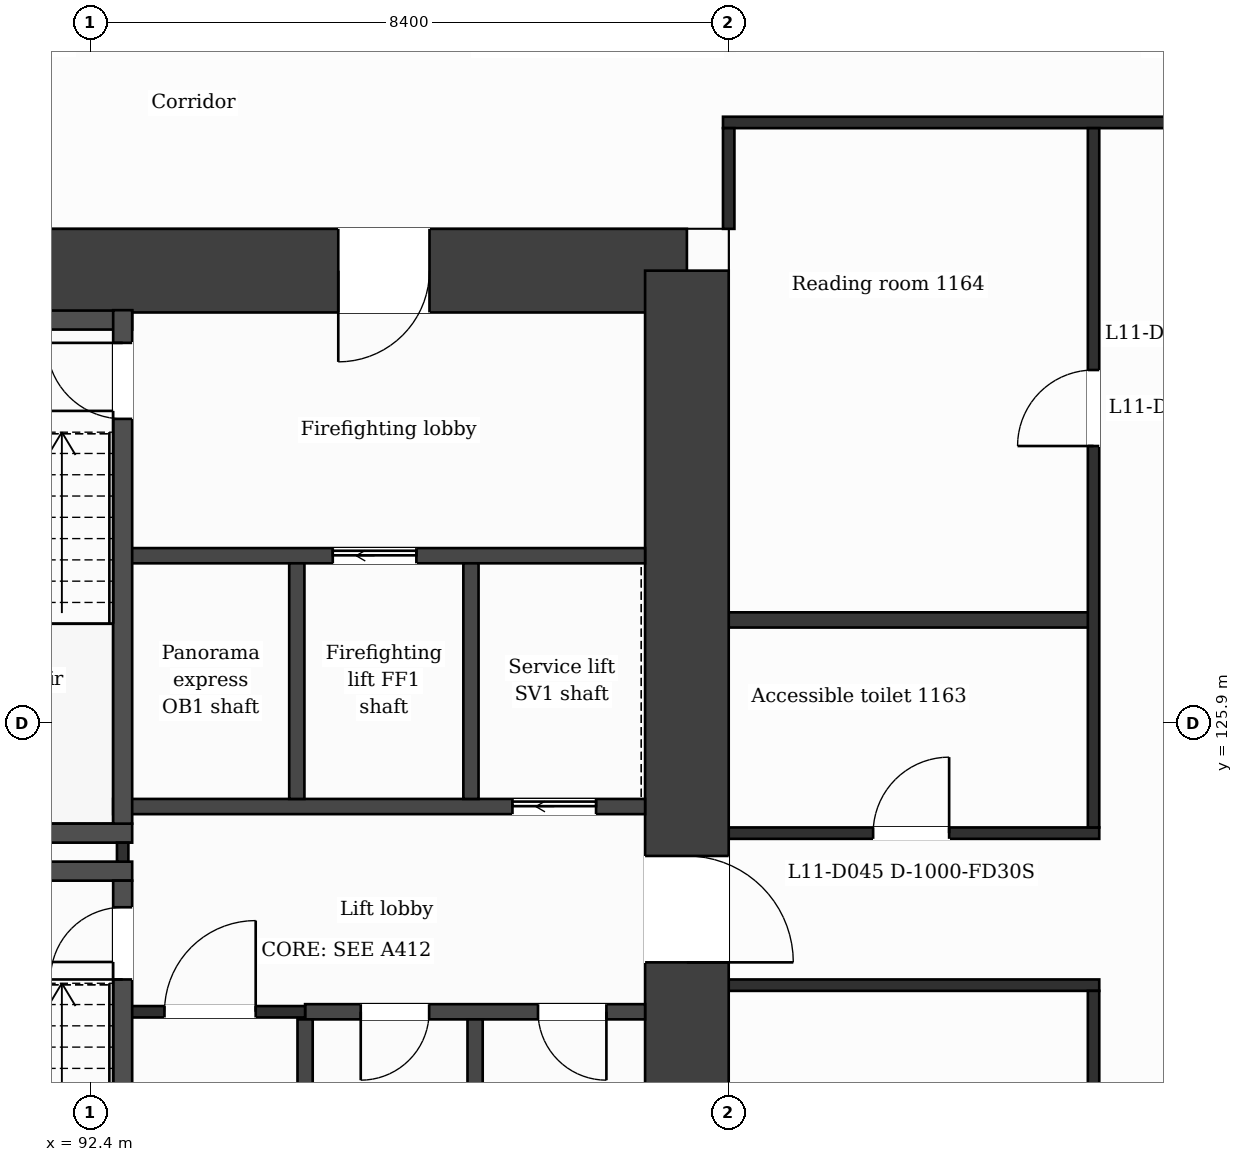
"""IFC4 building model, lengths in metres.
Left out: names, types, materials, properties, quantities, classifications, styles, units other than length and angle.
Written with IfcOpenShell. Run it as: python <this file> out.ifc"""

import sys

from ifc_helpers import new_model, si_unit, direction, frame, frame_2d, origin, place, context, subcontext, project, spatial, rectangle, extrude, element, fill, save


model = new_model("IFC4")
c1 = context("Model", 3, precision=1e-05, world=origin(), true_north=direction((0.0, 1.0)))
c2 = subcontext(c1, "Body", "Model", "MODEL_VIEW")
j1 = project(units=[si_unit("LENGTHUNIT", "METRE"), si_unit("PLANEANGLEUNIT", "RADIAN")], contexts=[c1])
p1 = place(None, origin())
s1 = spatial("IfcSite", under=j1, at=p1, CompositionType="ELEMENT")
p2 = place(p1, origin())
s2 = spatial("IfcBuilding", under=s1, at=p2, CompositionType="ELEMENT")
p3 = place(p2, frame((0.0, 0.0, 56.5)))
s3 = spatial("IfcBuildingStorey", under=s2, at=p3, CompositionType="ELEMENT", Elevation=56.5)
p4 = place(p3, frame((89.112, 131.85, 0.0), z_axis=(0.0, 0.0, 1.0), x_axis=(1.0, 0.0, 0.0)))
e1 = element("IfcWall", 1, at=p4, inside=s3, PredefinedType="SHEAR", context=c2, shape_type="SweptSolid", body=[
    extrude(rectangle(XDim=11.138, YDim=1.1, at=frame_2d((5.569, 0.0))), origin(), (0.0, 0.0, 1.0), 3.5),
])
p5 = place(p4, frame((6.552, 0.0, 0.0)))
e2 = element("IfcOpeningElement", 2, at=p5, cuts=e1, PredefinedType="OPENING", context=c2, shape_type="SweptSolid", body=[
    extrude(rectangle(XDim=1.2, YDim=2.1, at=frame_2d((0.6, 1.05))), frame((0.0, 0.56, 0.0), z_axis=(0.0, -1.0, 0.0), x_axis=(1.0, 0.0, 0.0)), (0.0, 0.0, 1.0), 1.12),
])
p6 = place(p3, frame((100.25, 131.85, 0.0), z_axis=(0.0, 0.0, 1.0), x_axis=(0.0, -1.0, 0.0)))
e3 = element("IfcWall", 3, at=p6, inside=s3, PredefinedType="SHEAR", context=c2, shape_type="SweptSolid", body=[
    extrude(rectangle(XDim=20.9, YDim=1.1, at=frame_2d((10.45, 0.0))), origin(), (0.0, 0.0, 1.0), 3.5),
])
p7 = place(p6, frame((7.7, 0.0, 0.0)))
e4 = element("IfcOpeningElement", 4, at=p7, cuts=e3, PredefinedType="OPENING", context=c2, shape_type="SweptSolid", body=[
    extrude(rectangle(XDim=1.4, YDim=2.1, at=frame_2d((0.7, 1.05))), frame((0.0, 0.56, 0.0), z_axis=(0.0, -1.0, 0.0), x_axis=(1.0, 0.0, 0.0)), (0.0, 0.0, 1.0), 1.12),
])
p8 = place(p3, frame((95.227, 122.1, 0.0), z_axis=(0.0, 0.0, 1.0), x_axis=(1.0, 0.0, 0.0)))
e5 = element("IfcWall", 5, at=p8, inside=s3, PredefinedType="PARTITIONING", context=c2, shape_type="SweptSolid", body=[
    extrude(rectangle(XDim=4.473, YDim=0.2, at=frame_2d((2.236, 0.0))), origin(), (0.0, 0.0, 1.0), 3.18),
])
p9 = place(p8, frame((0.732, 0.0, 0.0)))
e6 = element("IfcOpeningElement", 6, at=p9, cuts=e5, PredefinedType="OPENING", context=c2, shape_type="SweptSolid", body=[
    extrude(rectangle(XDim=0.9, YDim=2.1, at=frame_2d((0.45, 1.05))), frame((0.0, 0.11, 0.0), z_axis=(0.0, -1.0, 0.0), x_axis=(1.0, 0.0, 0.0)), (0.0, 0.0, 1.0), 0.22),
])
p10 = place(p8, frame((3.064, 0.0, 0.0)))
e7 = element("IfcOpeningElement", 7, at=p10, cuts=e5, PredefinedType="OPENING", context=c2, shape_type="SweptSolid", body=[
    extrude(rectangle(XDim=0.9, YDim=2.1, at=frame_2d((0.45, 1.05))), frame((0.0, 0.11, 0.0), z_axis=(0.0, -1.0, 0.0), x_axis=(1.0, 0.0, 0.0)), (0.0, 0.0, 1.0), 0.22),
])
p11 = place(p3, frame((92.827, 122.1, 0.0), z_axis=(0.0, 0.0, 1.0), x_axis=(1.0, 0.0, 0.0)))
e8 = element("IfcWall", 8, at=p11, inside=s3, PredefinedType="PARTITIONING", context=c2, shape_type="SweptSolid", body=[
    extrude(rectangle(XDim=2.4, YDim=0.15, at=frame_2d((1.2, 0.0))), origin(), (0.0, 0.0, 1.0), 3.18),
])
p12 = place(p11, frame((0.55, 0.0, 0.0)))
e9 = element("IfcOpeningElement", 9, at=p12, cuts=e8, PredefinedType="OPENING", context=c2, shape_type="SweptSolid", body=[
    extrude(rectangle(XDim=1.2, YDim=2.1, at=frame_2d((0.6, 1.05))), frame((0.0, 0.085, 0.0), z_axis=(0.0, -1.0, 0.0), x_axis=(1.0, 0.0, 0.0)), (0.0, 0.0, 1.0), 0.17),
])
p13 = place(p3, frame((100.8, 122.45, 0.0), z_axis=(0.0, 0.0, 1.0), x_axis=(1.0, 0.0, 0.0)))
e10 = element("IfcWall", 10, at=p13, inside=s3, PredefinedType="PARTITIONING", context=c2, shape_type="SweptSolid", body=[
    extrude(rectangle(XDim=4.875, YDim=0.15, at=frame_2d((2.438, 0.0))), origin(), (0.0, 0.0, 1.0), 3.18),
])
for number, where, z_axis, x_axis in (
    (11, (89.552, 123.95, 0.0), (0.0, 0.0, 1.0), (1.0, 0.0, 0.0)),
    (12, (89.552, 124.45, 0.0), (0.0, 0.0, 1.0), (1.0, 0.0, 0.0)),
):
    element("IfcWall", number, at=place(p3, frame(where, z_axis=z_axis, x_axis=x_axis)), inside=s3, PredefinedType="PARTITIONING", context=c2, shape_type="SweptSolid", body=[
        extrude(rectangle(XDim=3.4, YDim=0.25, at=frame_2d((1.7, 0.0))), origin(), (0.0, 0.0, 1.0), 3.18),
    ])
p14 = place(p3, frame((100.8, 124.45, 0.0), z_axis=(0.0, 0.0, 1.0), x_axis=(1.0, 0.0, 0.0)))
e13 = element("IfcWall", 13, at=p14, inside=s3, PredefinedType="PARTITIONING", context=c2, shape_type="SweptSolid", body=[
    extrude(rectangle(XDim=4.875, YDim=0.15, at=frame_2d((2.438, 0.0))), origin(), (0.0, 0.0, 1.0), 3.18),
])
p15 = place(p14, frame((1.9, 0.0, 0.0)))
e14 = element("IfcOpeningElement", 14, at=p15, cuts=e13, PredefinedType="OPENING", context=c2, shape_type="SweptSolid", body=[
    extrude(rectangle(XDim=1.0, YDim=2.1, at=frame_2d((0.5, 1.05))), frame((0.0, 0.085, 0.0), z_axis=(0.0, -1.0, 0.0), x_axis=(1.0, 0.0, 0.0)), (0.0, 0.0, 1.0), 0.17),
])
p16 = place(p3, frame((92.702, 124.8, 0.0), z_axis=(0.0, 0.0, 1.0), x_axis=(1.0, 0.0, 0.0)))
e15 = element("IfcWall", 15, at=p16, inside=s3, PredefinedType="PARTITIONING", context=c2, shape_type="SweptSolid", body=[
    extrude(rectangle(XDim=6.998, YDim=0.2, at=frame_2d((3.499, 0.0))), origin(), (0.0, 0.0, 1.0), 3.18),
])
p17 = place(p16, frame((5.253, 0.0, 0.0)))
e16 = element("IfcOpeningElement", 16, at=p17, cuts=e15, PredefinedType="OPENING", context=c2, shape_type="SweptSolid", body=[
    extrude(rectangle(XDim=1.1, YDim=2.1, at=frame_2d((0.55, 1.05))), frame((0.0, 0.11, 0.0), z_axis=(0.0, -1.0, 0.0), x_axis=(1.0, 0.0, 0.0)), (0.0, 0.0, 1.0), 0.22),
])
p18 = place(p3, frame((100.8, 127.255, 0.0), z_axis=(0.0, 0.0, 1.0), x_axis=(1.0, 0.0, 0.0)))
e17 = element("IfcWall", 17, at=p18, inside=s3, PredefinedType="PARTITIONING", context=c2, shape_type="SweptSolid", body=[
    extrude(rectangle(XDim=4.8, YDim=0.2, at=frame_2d((2.4, 0.0))), origin(), (0.0, 0.0, 1.0), 3.18),
])
p19 = place(p3, frame((92.827, 128.1, 0.0), z_axis=(0.0, 0.0, 1.0), x_axis=(1.0, 0.0, 0.0)))
e18 = element("IfcWall", 18, at=p19, inside=s3, PredefinedType="PARTITIONING", context=c2, shape_type="SweptSolid", body=[
    extrude(rectangle(XDim=6.873, YDim=0.2, at=frame_2d((3.437, 0.0))), origin(), (0.0, 0.0, 1.0), 3.18),
])
p20 = place(p19, frame((2.764, 0.0, 0.0)))
e19 = element("IfcOpeningElement", 19, at=p20, cuts=e18, PredefinedType="OPENING", context=c2, shape_type="SweptSolid", body=[
    extrude(rectangle(XDim=1.1, YDim=2.1, at=frame_2d((0.55, 1.05))), frame((0.0, 0.11, 0.0), z_axis=(0.0, -1.0, 0.0), x_axis=(1.0, 0.0, 0.0)), (0.0, 0.0, 1.0), 0.22),
])
p21 = place(p3, frame((89.552, 131.2, 0.0), z_axis=(0.0, 0.0, 1.0), x_axis=(1.0, 0.0, 0.0)))
e20 = element("IfcWall", 20, at=p21, inside=s3, PredefinedType="PARTITIONING", context=c2, shape_type="SweptSolid", body=[
    extrude(rectangle(XDim=3.4, YDim=0.25, at=frame_2d((1.7, 0.0))), origin(), (0.0, 0.0, 1.0), 3.18),
])
p22 = place(p3, frame((100.725, 133.8, 0.0), z_axis=(0.0, 0.0, 1.0), x_axis=(1.0, 0.0, 0.0)))
e21 = element("IfcWall", 21, at=p22, inside=s3, PredefinedType="PARTITIONING", context=c2, shape_type="SweptSolid", body=[
    extrude(rectangle(XDim=25.35, YDim=0.15, at=frame_2d((12.675, 0.0))), origin(), (0.0, 0.0, 1.0), 3.18),
])
p23 = place(p3, frame((92.827, 124.075, 0.0), z_axis=(0.0, 0.0, 1.0), x_axis=(0.0, 1.0, 0.0)))
e22 = element("IfcWall", 22, at=p23, inside=s3, PredefinedType="PARTITIONING", context=c2, shape_type="SweptSolid", body=[
    extrude(rectangle(XDim=0.25, YDim=0.15, at=frame_2d((0.125, 0.0))), origin(), (0.0, 0.0, 1.0), 3.18),
])
p24 = place(p3, frame((92.827, 117.07, 0.0), z_axis=(0.0, 0.0, 1.0), x_axis=(0.0, 1.0, 0.0)))
e23 = element("IfcWall", 23, at=p24, inside=s3, PredefinedType="PARTITIONING", context=c2, shape_type="SweptSolid", body=[
    extrude(rectangle(XDim=6.755, YDim=0.25, at=frame_2d((3.377, 0.0))), origin(), (0.0, 0.0, 1.0), 3.18),
])
p25 = place(p24, frame((5.455, 0.0, 0.0)))
e24 = element("IfcOpeningElement", 24, at=p25, cuts=e23, PredefinedType="OPENING", context=c2, shape_type="SweptSolid", body=[
    extrude(rectangle(XDim=0.95, YDim=2.1, at=frame_2d((0.475, 1.05))), frame((0.0, 0.135, 0.0), z_axis=(0.0, -1.0, 0.0), x_axis=(1.0, 0.0, 0.0)), (0.0, 0.0, 1.0), 0.27),
])
p26 = place(p3, frame((92.827, 124.575, 0.0), z_axis=(0.0, 0.0, 1.0), x_axis=(0.0, 1.0, 0.0)))
e25 = element("IfcWall", 25, at=p26, inside=s3, PredefinedType="PARTITIONING", context=c2, shape_type="SweptSolid", body=[
    extrude(rectangle(XDim=6.755, YDim=0.25, at=frame_2d((3.377, 0.0))), origin(), (0.0, 0.0, 1.0), 3.18),
])
p27 = place(p26, frame((5.325, 0.0, 0.0)))
e26 = element("IfcOpeningElement", 26, at=p27, cuts=e25, PredefinedType="OPENING", context=c2, shape_type="SweptSolid", body=[
    extrude(rectangle(XDim=1.0, YDim=2.1, at=frame_2d((0.5, 1.05))), frame((0.0, 0.135, 0.0), z_axis=(0.0, -1.0, 0.0), x_axis=(1.0, 0.0, 0.0)), (0.0, 0.0, 1.0), 0.27),
])
p28 = place(p3, frame((95.118, 124.9, 0.0), z_axis=(0.0, 0.0, 1.0), x_axis=(0.0, 1.0, 0.0)))
e27 = element("IfcWall", 27, at=p28, inside=s3, PredefinedType="PARTITIONING", context=c2, shape_type="SweptSolid", body=[
    extrude(rectangle(XDim=3.1, YDim=0.2, at=frame_2d((1.55, 0.0))), origin(), (0.0, 0.0, 1.0), 3.18),
])
p29 = place(p3, frame((95.227, 117.07, 0.0), z_axis=(0.0, 0.0, 1.0), x_axis=(0.0, 1.0, 0.0)))
e28 = element("IfcWall", 28, at=p29, inside=s3, PredefinedType="PARTITIONING", context=c2, shape_type="SweptSolid", body=[
    extrude(rectangle(XDim=4.93, YDim=0.2, at=frame_2d((2.465, 0.0))), origin(), (0.0, 0.0, 1.0), 3.18),
])
p30 = place(p29, frame((0.48, 0.0, 0.0)))
e29 = element("IfcOpeningElement", 29, at=p30, cuts=e28, PredefinedType="OPENING", context=c2, shape_type="SweptSolid", body=[
    extrude(rectangle(XDim=0.9, YDim=2.1, at=frame_2d((0.45, 1.05))), frame((0.0, 0.11, 0.0), z_axis=(0.0, -1.0, 0.0), x_axis=(1.0, 0.0, 0.0)), (0.0, 0.0, 1.0), 0.22),
])
for number, where, z_axis, x_axis in (
    (30, (97.409, 124.9, 0.0), (0.0, 0.0, 1.0), (0.0, 1.0, 0.0)),
    (31, (97.463, 118.9, 0.0), (0.0, 0.0, 1.0), (0.0, 1.0, 0.0)),
):
    element("IfcWall", number, at=place(p3, frame(where, z_axis=z_axis, x_axis=x_axis)), inside=s3, PredefinedType="PARTITIONING", context=c2, shape_type="SweptSolid", body=[
        extrude(rectangle(XDim=3.1, YDim=0.2, at=frame_2d((1.55, 0.0))), origin(), (0.0, 0.0, 1.0), 3.18),
    ])
p31 = place(p3, frame((100.8, 132.4, 0.0), z_axis=(0.0, 0.0, 1.0), x_axis=(0.0, 1.0, 0.0)))
e32 = element("IfcWall", 32, at=p31, inside=s3, PredefinedType="PARTITIONING", context=c2, shape_type="SweptSolid", body=[
    extrude(rectangle(XDim=1.325, YDim=0.15, at=frame_2d((0.663, 0.0))), origin(), (0.0, 0.0, 1.0), 3.18),
])
p32 = place(p3, frame((105.6, 109.075, 0.0), z_axis=(0.0, 0.0, 1.0), x_axis=(0.0, 1.0, 0.0)))
e33 = element("IfcWall", 33, at=p32, inside=s3, PredefinedType="PARTITIONING", context=c2, shape_type="SweptSolid", body=[
    extrude(rectangle(XDim=13.3, YDim=0.15, at=frame_2d((6.65, 0.0))), origin(), (0.0, 0.0, 1.0), 3.18),
])
p33 = place(p32, frame((8.167, 0.0, 0.0)))
e34 = element("IfcOpeningElement", 34, at=p33, cuts=e33, PredefinedType="OPENING", context=c2, shape_type="SweptSolid", body=[
    extrude(rectangle(XDim=1.0, YDim=2.1, at=frame_2d((0.5, 1.05))), frame((0.0, 0.085, 0.0), z_axis=(0.0, -1.0, 0.0), x_axis=(1.0, 0.0, 0.0)), (0.0, 0.0, 1.0), 0.17),
])
p34 = place(p3, frame((105.6, 124.525, 0.0), z_axis=(0.0, 0.0, 1.0), x_axis=(0.0, 1.0, 0.0)))
e35 = element("IfcWall", 35, at=p34, inside=s3, PredefinedType="PARTITIONING", context=c2, shape_type="SweptSolid", body=[
    extrude(rectangle(XDim=9.2, YDim=0.15, at=frame_2d((4.6, 0.0))), origin(), (0.0, 0.0, 1.0), 3.18),
])
p35 = place(p34, frame((5.018, 0.0, 0.0)))
e36 = element("IfcOpeningElement", 36, at=p35, cuts=e35, PredefinedType="OPENING", context=c2, shape_type="SweptSolid", body=[
    extrude(rectangle(XDim=1.0, YDim=2.1, at=frame_2d((0.5, 1.05))), frame((0.0, 0.085, 0.0), z_axis=(0.0, -1.0, 0.0), x_axis=(1.0, 0.0, 0.0)), (0.0, 0.0, 1.0), 0.17),
])
p36 = place(p12, origin())
e37 = element("IfcDoor", 37, at=p36, inside=s3, OperationType="SINGLE_SWING_RIGHT", PredefinedType="DOOR", context=c2, shape_type="SweptSolid", body=[
    extrude(rectangle(XDim=1.2, YDim=2.1, at=frame_2d((0.6, 1.05))), frame((0.0, 0.025, 0.0), z_axis=(0.0, -1.0, 0.0), x_axis=(1.0, 0.0, 0.0)), (0.0, 0.0, 1.0), 0.05),
])
fill(e9, e37)
p37 = place(p20, origin())
e38 = element("IfcDoor", 38, at=p37, inside=s3, OperationType="SLIDING_TO_LEFT", PredefinedType="DOOR", context=c2, shape_type="SweptSolid", body=[
    extrude(rectangle(XDim=1.1, YDim=2.1, at=frame_2d((0.55, 1.05))), frame((0.0, 0.025, 0.0), z_axis=(0.0, -1.0, 0.0), x_axis=(1.0, 0.0, 0.0)), (0.0, 0.0, 1.0), 0.05),
])
fill(e19, e38)
p38 = place(p17, origin())
e39 = element("IfcDoor", 39, at=p38, inside=s3, OperationType="SLIDING_TO_LEFT", PredefinedType="DOOR", context=c2, shape_type="SweptSolid", body=[
    extrude(rectangle(XDim=1.1, YDim=2.1, at=frame_2d((0.55, 1.05))), frame((0.0, 0.025, 0.0), z_axis=(0.0, -1.0, 0.0), x_axis=(1.0, 0.0, 0.0)), (0.0, 0.0, 1.0), 0.05),
])
fill(e16, e39)
p39 = place(p9, origin())
e40 = element("IfcDoor", 40, at=p39, inside=s3, OperationType="SINGLE_SWING_LEFT", PredefinedType="DOOR", context=c2, shape_type="SweptSolid", body=[
    extrude(rectangle(XDim=0.9, YDim=2.1, at=frame_2d((0.45, 1.05))), frame((0.0, 0.025, 0.0), z_axis=(0.0, -1.0, 0.0), x_axis=(1.0, 0.0, 0.0)), (0.0, 0.0, 1.0), 0.05),
])
fill(e6, e40)
p40 = place(p10, origin())
e41 = element("IfcDoor", 41, at=p40, inside=s3, OperationType="SINGLE_SWING_RIGHT", PredefinedType="DOOR", context=c2, shape_type="SweptSolid", body=[
    extrude(rectangle(XDim=0.9, YDim=2.1, at=frame_2d((0.45, 1.05))), frame((0.0, 0.025, 0.0), z_axis=(0.0, -1.0, 0.0), x_axis=(1.0, 0.0, 0.0)), (0.0, 0.0, 1.0), 0.05),
])
fill(e7, e41)
p41 = place(p25, origin())
e42 = element("IfcDoor", 42, at=p41, inside=s3, OperationType="SINGLE_SWING_LEFT", PredefinedType="DOOR", context=c2, shape_type="SweptSolid", body=[
    extrude(rectangle(XDim=0.95, YDim=2.1, at=frame_2d((0.475, 1.05))), frame((0.0, 0.025, 0.0), z_axis=(0.0, -1.0, 0.0), x_axis=(1.0, 0.0, 0.0)), (0.0, 0.0, 1.0), 0.05),
])
fill(e24, e42)
p42 = place(p27, origin())
e43 = element("IfcDoor", 43, at=p42, inside=s3, OperationType="SINGLE_SWING_RIGHT", PredefinedType="DOOR", context=c2, shape_type="SweptSolid", body=[
    extrude(rectangle(XDim=1.0, YDim=2.1, at=frame_2d((0.5, 1.05))), frame((0.0, 0.025, 0.0), z_axis=(0.0, -1.0, 0.0), x_axis=(1.0, 0.0, 0.0)), (0.0, 0.0, 1.0), 0.05),
])
fill(e26, e43)
p43 = place(p15, origin())
e44 = element("IfcDoor", 44, at=p43, inside=s3, OperationType="SINGLE_SWING_RIGHT", PredefinedType="DOOR", context=c2, shape_type="SweptSolid", body=[
    extrude(rectangle(XDim=1.0, YDim=2.1, at=frame_2d((0.5, 1.05))), frame((0.0, 0.025, 0.0), z_axis=(0.0, -1.0, 0.0), x_axis=(1.0, 0.0, 0.0)), (0.0, 0.0, 1.0), 0.05),
])
fill(e14, e44)
p44 = place(p35, origin())
e45 = element("IfcDoor", 45, at=p44, inside=s3, OperationType="SINGLE_SWING_LEFT", PredefinedType="DOOR", context=c2, shape_type="SweptSolid", body=[
    extrude(rectangle(XDim=1.0, YDim=2.1, at=frame_2d((0.5, 1.05))), frame((0.0, 0.025, 0.0), z_axis=(0.0, -1.0, 0.0), x_axis=(1.0, 0.0, 0.0)), (0.0, 0.0, 1.0), 0.05),
])
fill(e36, e45)
p45 = place(p5, origin())
e46 = element("IfcDoor", 46, at=p45, inside=s3, OperationType="SINGLE_SWING_LEFT", PredefinedType="DOOR", context=c2, shape_type="SweptSolid", body=[
    extrude(rectangle(XDim=1.2, YDim=2.1, at=frame_2d((0.6, 1.05))), frame((0.0, 0.025, 0.0), z_axis=(0.0, -1.0, 0.0), x_axis=(1.0, 0.0, 0.0)), (0.0, 0.0, 1.0), 0.05),
])
fill(e2, e46)
p46 = place(p7, origin())
e47 = element("IfcDoor", 47, at=p46, inside=s3, OperationType="SINGLE_SWING_RIGHT", PredefinedType="DOOR", context=c2, shape_type="SweptSolid", body=[
    extrude(rectangle(XDim=1.4, YDim=2.1, at=frame_2d((0.7, 1.05))), frame((0.0, 0.025, 0.0), z_axis=(0.0, -1.0, 0.0), x_axis=(1.0, 0.0, 0.0)), (0.0, 0.0, 1.0), 0.05),
])
fill(e4, e47)
save(model, sys.argv[1])
